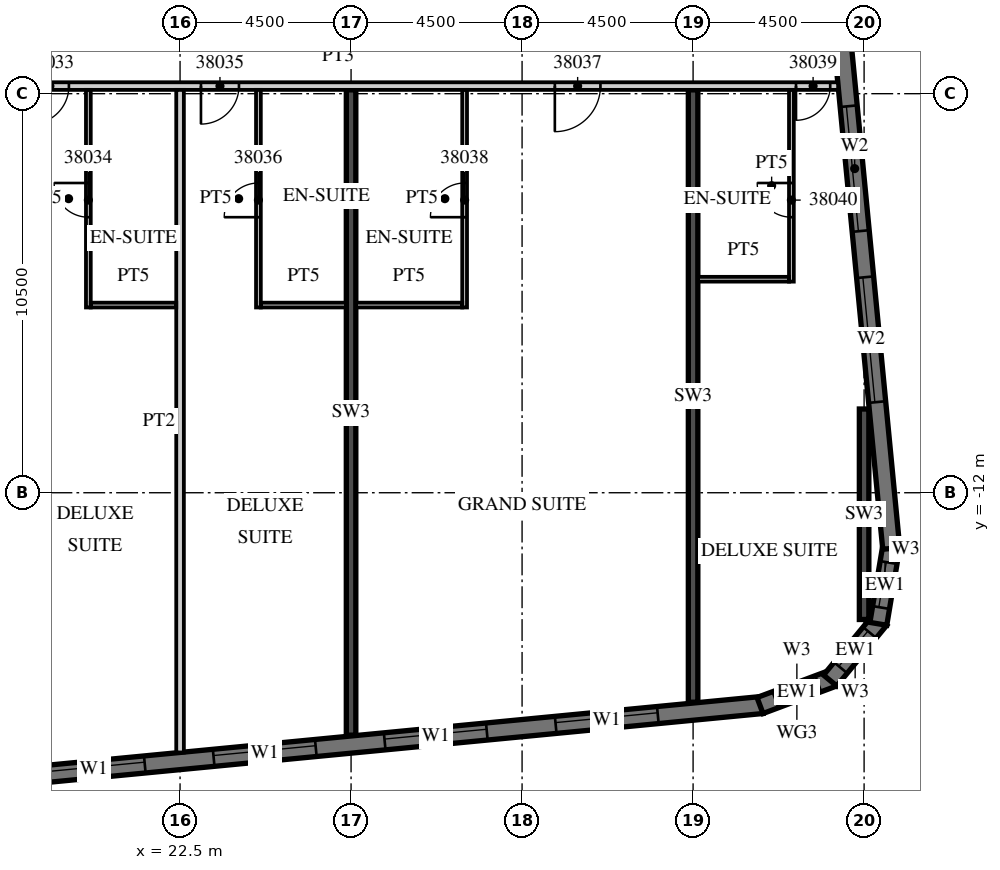
"""IFC4 building model, lengths in metres.
Left out: names, types, materials, properties, quantities, classifications, styles, units other than length and angle.
Written with IfcOpenShell. Run it as: python <this file> out.ifc"""

import sys

from ifc_helpers import new_model, si_unit, direction, frame, frame_2d, origin, place, context, subcontext, project, spatial, polyline, rectangle, outline, extrude, element, fill, save


model = new_model("IFC4")
c1 = context("Model", 3, precision=1e-05, world=origin(), true_north=direction((0.0, 1.0)))
c2 = subcontext(c1, "Body", "Model", "MODEL_VIEW")
j1 = project(units=[si_unit("LENGTHUNIT", "METRE"), si_unit("PLANEANGLEUNIT", "RADIAN")], contexts=[c1])
p1 = place(None, origin())
s1 = spatial("IfcSite", under=j1, at=p1, CompositionType="ELEMENT")
p2 = place(p1, origin())
s2 = spatial("IfcBuilding", under=s1, at=p2, CompositionType="ELEMENT")
p3 = place(p2, frame((0.0, 0.0, 166.9)))
s3 = spatial("IfcBuildingStorey", under=s2, at=p3, CompositionType="ELEMENT", Elevation=166.9)
p4 = place(p3, frame((27.0, -18.379, 0.0), z_axis=(0.0, 0.0, 1.0), x_axis=(0.0, 1.0, 0.0)))
e1 = element("IfcWall", 1, at=p4, inside=s3, PredefinedType="SHEAR", context=c2, shape_type="SweptSolid", body=[
    extrude(rectangle(XDim=16.979, YDim=0.25, at=frame_2d((8.489, 0.0))), origin(), (0.0, 0.0, 1.0), 3.3),
])
p5 = place(p3, frame((36.0, -17.512, 0.0), z_axis=(0.0, 0.0, 1.0), x_axis=(0.0, 1.0, 0.0)))
e2 = element("IfcWall", 2, at=p5, inside=s3, PredefinedType="SHEAR", context=c2, shape_type="SweptSolid", body=[
    extrude(rectangle(XDim=16.112, YDim=0.25, at=frame_2d((8.056, 0.0))), origin(), (0.0, 0.0, 1.0), 3.3),
])
p6 = place(p3, frame((40.5, -15.335, 0.0), z_axis=(0.0, 0.0, 1.0), x_axis=(0.0, 1.0, 0.0)))
e3 = element("IfcWall", 3, at=p6, inside=s3, PredefinedType="SHEAR", context=c2, shape_type="SweptSolid", body=[
    extrude(rectangle(XDim=5.538, YDim=0.25, at=frame_2d((2.769, 0.0))), origin(), (0.0, 0.0, 1.0), 3.3),
])
p7 = place(p3, frame((-13.521, -22.529, 0.0), z_axis=(0.0, 0.0, 1.0), x_axis=(0.995396436651, 0.095843277819, 0.0)))
e4 = element("IfcWall", 4, at=p7, inside=s3, PredefinedType="SOLIDWALL", context=c2, shape_type="SweptSolid", body=[
    extrude(rectangle(XDim=51.578, YDim=0.45, at=frame_2d((25.789, 0.0))), origin(), (0.0, 0.0, 1.0), 3.02),
])
p8 = place(p7, frame((0.91, 0.0, 0.45)))
e5 = element("IfcOpeningElement", 5, at=p8, cuts=e4, PredefinedType="OPENING", context=c2, shape_type="SweptSolid", body=[
    extrude(rectangle(XDim=2.7, YDim=2.25, at=frame_2d((1.35, 1.125))), frame((0.0, 0.235, 0.0), z_axis=(0.0, -1.0, 0.0), x_axis=(1.0, 0.0, 0.0)), (0.0, 0.0, 1.0), 0.47),
])
p9 = place(p7, frame((5.431, 0.0, 0.45)))
e6 = element("IfcOpeningElement", 6, at=p9, cuts=e4, PredefinedType="OPENING", context=c2, shape_type="SweptSolid", body=[
    extrude(rectangle(XDim=2.7, YDim=2.25, at=frame_2d((1.35, 1.125))), frame((0.0, 0.235, 0.0), z_axis=(0.0, -1.0, 0.0), x_axis=(1.0, 0.0, 0.0)), (0.0, 0.0, 1.0), 0.47),
])
p10 = place(p7, frame((9.952, 0.0, 0.45)))
e7 = element("IfcOpeningElement", 7, at=p10, cuts=e4, PredefinedType="OPENING", context=c2, shape_type="SweptSolid", body=[
    extrude(rectangle(XDim=2.7, YDim=2.25, at=frame_2d((1.35, 1.125))), frame((0.0, 0.235, 0.0), z_axis=(0.0, -1.0, 0.0), x_axis=(1.0, 0.0, 0.0)), (0.0, 0.0, 1.0), 0.47),
])
p11 = place(p7, frame((14.473, 0.0, 0.45)))
e8 = element("IfcOpeningElement", 8, at=p11, cuts=e4, PredefinedType="OPENING", context=c2, shape_type="SweptSolid", body=[
    extrude(rectangle(XDim=2.7, YDim=2.25, at=frame_2d((1.35, 1.125))), frame((0.0, 0.235, 0.0), z_axis=(0.0, -1.0, 0.0), x_axis=(1.0, 0.0, 0.0)), (0.0, 0.0, 1.0), 0.47),
])
p12 = place(p7, frame((18.994, 0.0, 0.45)))
e9 = element("IfcOpeningElement", 9, at=p12, cuts=e4, PredefinedType="OPENING", context=c2, shape_type="SweptSolid", body=[
    extrude(rectangle(XDim=2.7, YDim=2.25, at=frame_2d((1.35, 1.125))), frame((0.0, 0.235, 0.0), z_axis=(0.0, -1.0, 0.0), x_axis=(1.0, 0.0, 0.0)), (0.0, 0.0, 1.0), 0.47),
])
p13 = place(p7, frame((23.514, 0.0, 0.45)))
e10 = element("IfcOpeningElement", 10, at=p13, cuts=e4, PredefinedType="OPENING", context=c2, shape_type="SweptSolid", body=[
    extrude(rectangle(XDim=2.7, YDim=2.25, at=frame_2d((1.35, 1.125))), frame((0.0, 0.235, 0.0), z_axis=(0.0, -1.0, 0.0), x_axis=(1.0, 0.0, 0.0)), (0.0, 0.0, 1.0), 0.47),
])
p14 = place(p7, frame((28.035, 0.0, 0.45)))
e11 = element("IfcOpeningElement", 11, at=p14, cuts=e4, PredefinedType="OPENING", context=c2, shape_type="SweptSolid", body=[
    extrude(rectangle(XDim=2.7, YDim=2.25, at=frame_2d((1.35, 1.125))), frame((0.0, 0.235, 0.0), z_axis=(0.0, -1.0, 0.0), x_axis=(1.0, 0.0, 0.0)), (0.0, 0.0, 1.0), 0.47),
])
p15 = place(p7, frame((32.556, 0.0, 0.45)))
e12 = element("IfcOpeningElement", 12, at=p15, cuts=e4, PredefinedType="OPENING", context=c2, shape_type="SweptSolid", body=[
    extrude(rectangle(XDim=2.7, YDim=2.25, at=frame_2d((1.35, 1.125))), frame((0.0, 0.235, 0.0), z_axis=(0.0, -1.0, 0.0), x_axis=(1.0, 0.0, 0.0)), (0.0, 0.0, 1.0), 0.47),
])
p16 = place(p7, frame((37.077, 0.0, 0.45)))
e13 = element("IfcOpeningElement", 13, at=p16, cuts=e4, PredefinedType="OPENING", context=c2, shape_type="SweptSolid", body=[
    extrude(rectangle(XDim=2.7, YDim=2.25, at=frame_2d((1.35, 1.125))), frame((0.0, 0.235, 0.0), z_axis=(0.0, -1.0, 0.0), x_axis=(1.0, 0.0, 0.0)), (0.0, 0.0, 1.0), 0.47),
])
p17 = place(p7, frame((41.598, 0.0, 0.45)))
e14 = element("IfcOpeningElement", 14, at=p17, cuts=e4, PredefinedType="OPENING", context=c2, shape_type="SweptSolid", body=[
    extrude(rectangle(XDim=2.7, YDim=2.25, at=frame_2d((1.35, 1.125))), frame((0.0, 0.235, 0.0), z_axis=(0.0, -1.0, 0.0), x_axis=(1.0, 0.0, 0.0)), (0.0, 0.0, 1.0), 0.47),
])
p18 = place(p7, frame((46.119, 0.0, 0.45)))
e15 = element("IfcOpeningElement", 15, at=p18, cuts=e4, PredefinedType="OPENING", context=c2, shape_type="SweptSolid", body=[
    extrude(rectangle(XDim=2.7, YDim=2.25, at=frame_2d((1.35, 1.125))), frame((0.0, 0.235, 0.0), z_axis=(0.0, -1.0, 0.0), x_axis=(1.0, 0.0, 0.0)), (0.0, 0.0, 1.0), 0.47),
])
p19 = place(p3, frame((37.761, -17.598, 0.0), z_axis=(0.0, 0.0, 1.0), x_axis=(0.936677599948, 0.350192909346, 0.0)))
e16 = element("IfcWall", 16, at=p19, inside=s3, PredefinedType="SOLIDWALL", context=c2, shape_type="SweptSolid", body=[
    extrude(outline(polyline([(0.0, -0.225), (2.071, -0.225), (1.95, 0.225), (0.121, 0.225), (0.0, -0.225)])), origin(), (0.0, 0.0, 1.0), 3.02),
])
p20 = place(p19, frame((0.435, 0.0, 0.45)))
e17 = element("IfcOpeningElement", 17, at=p20, cuts=e16, PredefinedType="OPENING", context=c2, shape_type="SweptSolid", body=[
    extrude(rectangle(XDim=1.2, YDim=2.25, at=frame_2d((0.6, 1.125))), frame((0.0, 0.235, 0.0), z_axis=(0.0, -1.0, 0.0), x_axis=(1.0, 0.0, 0.0)), (0.0, 0.0, 1.0), 0.47),
])
p21 = place(p3, frame((39.606, -16.941, 0.0), z_axis=(0.0, 0.0, 1.0), x_axis=(0.636116318187, 0.771593176315, 0.0)))
e18 = element("IfcWall", 18, at=p21, inside=s3, PredefinedType="SOLIDWALL", context=c2, shape_type="SweptSolid", body=[
    extrude(outline(polyline([(0.0, -0.225), (2.071, -0.225), (1.95, 0.225), (0.121, 0.225), (0.0, -0.225)])), origin(), (0.0, 0.0, 1.0), 3.02),
])
p22 = place(p21, frame((0.435, 0.0, 0.45)))
e19 = element("IfcOpeningElement", 19, at=p22, cuts=e18, PredefinedType="OPENING", context=c2, shape_type="SweptSolid", body=[
    extrude(rectangle(XDim=1.2, YDim=2.25, at=frame_2d((0.6, 1.125))), frame((0.0, 0.235, 0.0), z_axis=(0.0, -1.0, 0.0), x_axis=(1.0, 0.0, 0.0)), (0.0, 0.0, 1.0), 0.47),
])
p23 = place(p3, frame((40.875, -15.449, 0.0), z_axis=(0.0, 0.0, 1.0), x_axis=(0.164953448126, 0.986301353518, 0.0)))
e20 = element("IfcWall", 20, at=p23, inside=s3, PredefinedType="SOLIDWALL", context=c2, shape_type="SweptSolid", body=[
    extrude(outline(polyline([(0.0, -0.225), (2.071, -0.225), (1.95, 0.225), (0.121, 0.225), (0.0, -0.225)])), origin(), (0.0, 0.0, 1.0), 3.02),
])
p24 = place(p23, frame((0.435, 0.0, 0.45)))
e21 = element("IfcOpeningElement", 21, at=p24, cuts=e20, PredefinedType="OPENING", context=c2, shape_type="SweptSolid", body=[
    extrude(rectangle(XDim=1.2, YDim=2.25, at=frame_2d((0.6, 1.125))), frame((0.0, 0.235, 0.0), z_axis=(0.0, -1.0, 0.0), x_axis=(1.0, 0.0, 0.0)), (0.0, 0.0, 1.0), 0.47),
])
p25 = place(p3, frame((41.214, -13.466, 0.0), z_axis=(0.0, 0.0, 1.0), x_axis=(-0.095847314626, 0.995396047952, 0.0)))
e22 = element("IfcWall", 22, at=p25, inside=s3, PredefinedType="SOLIDWALL", context=c2, shape_type="SweptSolid", body=[
    extrude(rectangle(XDim=34.0, YDim=0.45, at=frame_2d((17.0, 0.0))), origin(), (0.0, 0.0, 1.0), 3.02),
])
p26 = place(p25, frame((3.869, 0.0, 0.45)))
e23 = element("IfcOpeningElement", 23, at=p26, cuts=e22, PredefinedType="OPENING", context=c2, shape_type="SweptSolid", body=[
    extrude(rectangle(XDim=3.3, YDim=2.25, at=frame_2d((1.65, 1.125))), frame((0.0, 0.235, 0.0), z_axis=(0.0, -1.0, 0.0), x_axis=(1.0, 0.0, 0.0)), (0.0, 0.0, 1.0), 0.47),
])
p27 = place(p25, frame((8.39, 0.0, 0.45)))
e24 = element("IfcOpeningElement", 24, at=p27, cuts=e22, PredefinedType="OPENING", context=c2, shape_type="SweptSolid", body=[
    extrude(rectangle(XDim=3.3, YDim=2.25, at=frame_2d((1.65, 1.125))), frame((0.0, 0.235, 0.0), z_axis=(0.0, -1.0, 0.0), x_axis=(1.0, 0.0, 0.0)), (0.0, 0.0, 1.0), 0.47),
])
p28 = place(p3, frame((13.5, -1.3, 0.0), z_axis=(0.0, 0.0, 1.0), x_axis=(1.0, 0.0, 0.0)))
e25 = element("IfcWall", 25, at=p28, inside=s3, PredefinedType="PARTITIONING", context=c2, shape_type="SweptSolid", body=[
    extrude(rectangle(XDim=26.317, YDim=0.2, at=frame_2d((13.158, 0.0))), origin(), (0.0, 0.0, 1.0), 3.02),
])
p29 = place(p28, frame((2.925, 0.0, 0.0)))
e26 = element("IfcOpeningElement", 26, at=p29, cuts=e25, PredefinedType="OPENING", context=c2, shape_type="SweptSolid", body=[
    extrude(rectangle(XDim=1.0, YDim=2.1, at=frame_2d((0.5, 1.05))), frame((0.0, 0.11, 0.0), z_axis=(0.0, -1.0, 0.0), x_axis=(1.0, 0.0, 0.0)), (0.0, 0.0, 1.0), 0.22),
])
p30 = place(p28, frame((5.075, 0.0, 0.0)))
e27 = element("IfcOpeningElement", 27, at=p30, cuts=e25, PredefinedType="OPENING", context=c2, shape_type="SweptSolid", body=[
    extrude(rectangle(XDim=1.0, YDim=2.1, at=frame_2d((0.5, 1.05))), frame((0.0, 0.11, 0.0), z_axis=(0.0, -1.0, 0.0), x_axis=(1.0, 0.0, 0.0)), (0.0, 0.0, 1.0), 0.22),
])
p31 = place(p28, frame((9.55, 0.0, 0.0)))
e28 = element("IfcOpeningElement", 28, at=p31, cuts=e25, PredefinedType="OPENING", context=c2, shape_type="SweptSolid", body=[
    extrude(rectangle(XDim=1.0, YDim=2.1, at=frame_2d((0.5, 1.05))), frame((0.0, 0.11, 0.0), z_axis=(0.0, -1.0, 0.0), x_axis=(1.0, 0.0, 0.0)), (0.0, 0.0, 1.0), 0.22),
])
p32 = place(p28, frame((18.862, 0.0, 0.0)))
e29 = element("IfcOpeningElement", 29, at=p32, cuts=e25, PredefinedType="OPENING", context=c2, shape_type="SweptSolid", body=[
    extrude(rectangle(XDim=1.2, YDim=2.1, at=frame_2d((0.6, 1.05))), frame((0.0, 0.11, 0.0), z_axis=(0.0, -1.0, 0.0), x_axis=(1.0, 0.0, 0.0)), (0.0, 0.0, 1.0), 0.22),
])
p33 = place(p28, frame((25.208, 0.0, 0.0)))
e30 = element("IfcOpeningElement", 30, at=p33, cuts=e25, PredefinedType="OPENING", context=c2, shape_type="SweptSolid", body=[
    extrude(rectangle(XDim=0.9, YDim=2.1, at=frame_2d((0.45, 1.05))), frame((0.0, 0.11, 0.0), z_axis=(0.0, -1.0, 0.0), x_axis=(1.0, 0.0, 0.0)), (0.0, 0.0, 1.0), 0.22),
])
p34 = place(p3, frame((22.5, -18.834, 0.0), z_axis=(0.0, 0.0, 1.0), x_axis=(0.0, 1.0, 0.0)))
e31 = element("IfcWall", 31, at=p34, inside=s3, PredefinedType="PARTITIONING", context=c2, shape_type="SweptSolid", body=[
    extrude(rectangle(XDim=17.434, YDim=0.2, at=frame_2d((8.717, 0.0))), origin(), (0.0, 0.0, 1.0), 3.02),
])
p35 = place(p3, frame((20.087, -7.125, 0.0), z_axis=(0.0, 0.0, 1.0), x_axis=(0.0, 1.0, 0.0)))
e32 = element("IfcWall", 32, at=p35, inside=s3, PredefinedType="PARTITIONING", context=c2, shape_type="SweptSolid", body=[
    extrude(rectangle(XDim=5.725, YDim=0.125, at=frame_2d((2.863, 0.0))), origin(), (0.0, 0.0, 1.0), 3.02),
])
p36 = place(p35, frame((2.375, 0.0, 0.0)))
e33 = element("IfcOpeningElement", 33, at=p36, cuts=e32, PredefinedType="OPENING", context=c2, shape_type="SweptSolid", body=[
    extrude(rectangle(XDim=0.9, YDim=2.1, at=frame_2d((0.45, 1.05))), frame((0.0, 0.073, 0.0), z_axis=(0.0, -1.0, 0.0), x_axis=(1.0, 0.0, 0.0)), (0.0, 0.0, 1.0), 0.145),
])
p37 = place(p3, frame((20.15, -7.062, 0.0), z_axis=(0.0, 0.0, 1.0), x_axis=(1.0, 0.0, 0.0)))
e34 = element("IfcWall", 34, at=p37, inside=s3, PredefinedType="PARTITIONING", context=c2, shape_type="SweptSolid", body=[
    extrude(rectangle(XDim=2.25, YDim=0.125, at=frame_2d((1.125, 0.0))), origin(), (0.0, 0.0, 1.0), 3.02),
])
p38 = place(p3, frame((24.562, -7.125, 0.0), z_axis=(0.0, 0.0, 1.0), x_axis=(0.0, 1.0, 0.0)))
e35 = element("IfcWall", 35, at=p38, inside=s3, PredefinedType="PARTITIONING", context=c2, shape_type="SweptSolid", body=[
    extrude(rectangle(XDim=5.725, YDim=0.125, at=frame_2d((2.863, 0.0))), origin(), (0.0, 0.0, 1.0), 3.02),
])
p39 = place(p38, frame((2.375, 0.0, 0.0)))
e36 = element("IfcOpeningElement", 36, at=p39, cuts=e35, PredefinedType="OPENING", context=c2, shape_type="SweptSolid", body=[
    extrude(rectangle(XDim=0.9, YDim=2.1, at=frame_2d((0.45, 1.05))), frame((0.0, 0.073, 0.0), z_axis=(0.0, -1.0, 0.0), x_axis=(1.0, 0.0, 0.0)), (0.0, 0.0, 1.0), 0.145),
])
p40 = place(p3, frame((24.625, -7.062, 0.0), z_axis=(0.0, 0.0, 1.0), x_axis=(1.0, 0.0, 0.0)))
e37 = element("IfcWall", 37, at=p40, inside=s3, PredefinedType="PARTITIONING", context=c2, shape_type="SweptSolid", body=[
    extrude(rectangle(XDim=2.25, YDim=0.125, at=frame_2d((1.125, 0.0))), origin(), (0.0, 0.0, 1.0), 3.02),
])
p41 = place(p3, frame((29.988, -7.125, 0.0), z_axis=(0.0, 0.0, 1.0), x_axis=(0.0, 1.0, 0.0)))
e38 = element("IfcWall", 38, at=p41, inside=s3, PredefinedType="PARTITIONING", context=c2, shape_type="SweptSolid", body=[
    extrude(rectangle(XDim=5.725, YDim=0.125, at=frame_2d((2.863, 0.0))), origin(), (0.0, 0.0, 1.0), 3.02),
])
p42 = place(p41, frame((2.375, 0.0, 0.0)))
e39 = element("IfcOpeningElement", 39, at=p42, cuts=e38, PredefinedType="OPENING", context=c2, shape_type="SweptSolid", body=[
    extrude(rectangle(XDim=0.9, YDim=2.1, at=frame_2d((0.45, 1.05))), frame((0.0, 0.073, 0.0), z_axis=(0.0, -1.0, 0.0), x_axis=(1.0, 0.0, 0.0)), (0.0, 0.0, 1.0), 0.145),
])
p43 = place(p3, frame((27.125, -7.062, 0.0), z_axis=(0.0, 0.0, 1.0), x_axis=(1.0, 0.0, 0.0)))
e40 = element("IfcWall", 40, at=p43, inside=s3, PredefinedType="PARTITIONING", context=c2, shape_type="SweptSolid", body=[
    extrude(rectangle(XDim=2.8, YDim=0.125, at=frame_2d((1.4, 0.0))), origin(), (0.0, 0.0, 1.0), 3.02),
])
p44 = place(p3, frame((38.587, -6.445, 0.0), z_axis=(0.0, 0.0, 1.0), x_axis=(0.0, 1.0, 0.0)))
e41 = element("IfcWall", 41, at=p44, inside=s3, PredefinedType="PARTITIONING", context=c2, shape_type="SweptSolid", body=[
    extrude(rectangle(XDim=5.045, YDim=0.125, at=frame_2d((2.522, 0.0))), origin(), (0.0, 0.0, 1.0), 3.02),
])
p45 = place(p44, frame((1.695, 0.0, 0.0)))
e42 = element("IfcOpeningElement", 42, at=p45, cuts=e41, PredefinedType="OPENING", context=c2, shape_type="SweptSolid", body=[
    extrude(rectangle(XDim=0.9, YDim=2.1, at=frame_2d((0.45, 1.05))), frame((0.0, 0.073, 0.0), z_axis=(0.0, -1.0, 0.0), x_axis=(1.0, 0.0, 0.0)), (0.0, 0.0, 1.0), 0.145),
])
p46 = place(p3, frame((36.125, -6.382, 0.0), z_axis=(0.0, 0.0, 1.0), x_axis=(1.0, 0.0, 0.0)))
e43 = element("IfcWall", 43, at=p46, inside=s3, PredefinedType="PARTITIONING", context=c2, shape_type="SweptSolid", body=[
    extrude(rectangle(XDim=2.4, YDim=0.125, at=frame_2d((1.2, 0.0))), origin(), (0.0, 0.0, 1.0), 3.02),
])
p47 = place(p15, origin())
e44 = element("IfcWindow", 44, at=p47, inside=s3, PartitioningType="SINGLE_PANEL", PredefinedType="WINDOW", context=c2, shape_type="SweptSolid", body=[
    extrude(rectangle(XDim=2.7, YDim=2.25, at=frame_2d((1.35, 1.125))), frame((0.0, 0.09, 0.0), z_axis=(0.0, -1.0, 0.0), x_axis=(1.0, 0.0, 0.0)), (0.0, 0.0, 1.0), 0.06),
])
fill(e12, e44)
p48 = place(p16, origin())
e45 = element("IfcWindow", 45, at=p48, inside=s3, PartitioningType="SINGLE_PANEL", PredefinedType="WINDOW", context=c2, shape_type="SweptSolid", body=[
    extrude(rectangle(XDim=2.7, YDim=2.25, at=frame_2d((1.35, 1.125))), frame((0.0, 0.09, 0.0), z_axis=(0.0, -1.0, 0.0), x_axis=(1.0, 0.0, 0.0)), (0.0, 0.0, 1.0), 0.06),
])
fill(e13, e45)
p49 = place(p17, origin())
e46 = element("IfcWindow", 46, at=p49, inside=s3, PartitioningType="SINGLE_PANEL", PredefinedType="WINDOW", context=c2, shape_type="SweptSolid", body=[
    extrude(rectangle(XDim=2.7, YDim=2.25, at=frame_2d((1.35, 1.125))), frame((0.0, 0.09, 0.0), z_axis=(0.0, -1.0, 0.0), x_axis=(1.0, 0.0, 0.0)), (0.0, 0.0, 1.0), 0.06),
])
fill(e14, e46)
p50 = place(p18, origin())
e47 = element("IfcWindow", 47, at=p50, inside=s3, PartitioningType="SINGLE_PANEL", PredefinedType="WINDOW", context=c2, shape_type="SweptSolid", body=[
    extrude(rectangle(XDim=2.7, YDim=2.25, at=frame_2d((1.35, 1.125))), frame((0.0, 0.09, 0.0), z_axis=(0.0, -1.0, 0.0), x_axis=(1.0, 0.0, 0.0)), (0.0, 0.0, 1.0), 0.06),
])
fill(e15, e47)
p51 = place(p20, origin())
e48 = element("IfcWindow", 48, at=p51, inside=s3, PartitioningType="SINGLE_PANEL", PredefinedType="WINDOW", context=c2, shape_type="SweptSolid", body=[
    extrude(rectangle(XDim=1.2, YDim=2.25, at=frame_2d((0.6, 1.125))), frame((0.0, 0.09, 0.0), z_axis=(0.0, -1.0, 0.0), x_axis=(1.0, 0.0, 0.0)), (0.0, 0.0, 1.0), 0.06),
])
fill(e17, e48)
p52 = place(p22, origin())
e49 = element("IfcWindow", 49, at=p52, inside=s3, PartitioningType="SINGLE_PANEL", PredefinedType="WINDOW", context=c2, shape_type="SweptSolid", body=[
    extrude(rectangle(XDim=1.2, YDim=2.25, at=frame_2d((0.6, 1.125))), frame((0.0, 0.09, 0.0), z_axis=(0.0, -1.0, 0.0), x_axis=(1.0, 0.0, 0.0)), (0.0, 0.0, 1.0), 0.06),
])
fill(e19, e49)
p53 = place(p24, origin())
e50 = element("IfcWindow", 50, at=p53, inside=s3, PartitioningType="SINGLE_PANEL", PredefinedType="WINDOW", context=c2, shape_type="SweptSolid", body=[
    extrude(rectangle(XDim=1.2, YDim=2.25, at=frame_2d((0.6, 1.125))), frame((0.0, 0.09, 0.0), z_axis=(0.0, -1.0, 0.0), x_axis=(1.0, 0.0, 0.0)), (0.0, 0.0, 1.0), 0.06),
])
fill(e21, e50)
p54 = place(p26, origin())
e51 = element("IfcWindow", 51, at=p54, inside=s3, PartitioningType="SINGLE_PANEL", PredefinedType="WINDOW", context=c2, shape_type="SweptSolid", body=[
    extrude(rectangle(XDim=3.3, YDim=2.25, at=frame_2d((1.65, 1.125))), frame((0.0, 0.09, 0.0), z_axis=(0.0, -1.0, 0.0), x_axis=(1.0, 0.0, 0.0)), (0.0, 0.0, 1.0), 0.06),
])
fill(e23, e51)
p55 = place(p27, origin())
e52 = element("IfcWindow", 52, at=p55, inside=s3, PartitioningType="SINGLE_PANEL", PredefinedType="WINDOW", context=c2, shape_type="SweptSolid", body=[
    extrude(rectangle(XDim=3.3, YDim=2.25, at=frame_2d((1.65, 1.125))), frame((0.0, 0.09, 0.0), z_axis=(0.0, -1.0, 0.0), x_axis=(1.0, 0.0, 0.0)), (0.0, 0.0, 1.0), 0.06),
])
fill(e24, e52)
p56 = place(p30, origin())
e53 = element("IfcDoor", 53, at=p56, inside=s3, OperationType="SINGLE_SWING_LEFT", PredefinedType="DOOR", context=c2, shape_type="SweptSolid", body=[
    extrude(rectangle(XDim=1.0, YDim=2.1, at=frame_2d((0.5, 1.05))), frame((0.0, 0.025, 0.0), z_axis=(0.0, -1.0, 0.0), x_axis=(1.0, 0.0, 0.0)), (0.0, 0.0, 1.0), 0.05),
])
fill(e27, e53)
p57 = place(p36, origin())
e54 = element("IfcDoor", 54, at=p57, inside=s3, OperationType="SINGLE_SWING_RIGHT", PredefinedType="DOOR", context=c2, shape_type="SweptSolid", body=[
    extrude(rectangle(XDim=0.9, YDim=2.1, at=frame_2d((0.45, 1.05))), frame((0.0, 0.025, 0.0), z_axis=(0.0, -1.0, 0.0), x_axis=(1.0, 0.0, 0.0)), (0.0, 0.0, 1.0), 0.05),
])
fill(e33, e54)
p58 = place(p31, origin())
e55 = element("IfcDoor", 55, at=p58, inside=s3, OperationType="SINGLE_SWING_LEFT", PredefinedType="DOOR", context=c2, shape_type="SweptSolid", body=[
    extrude(rectangle(XDim=1.0, YDim=2.1, at=frame_2d((0.5, 1.05))), frame((0.0, 0.025, 0.0), z_axis=(0.0, -1.0, 0.0), x_axis=(1.0, 0.0, 0.0)), (0.0, 0.0, 1.0), 0.05),
])
fill(e28, e55)
p59 = place(p39, origin())
e56 = element("IfcDoor", 56, at=p59, inside=s3, OperationType="SINGLE_SWING_LEFT", PredefinedType="DOOR", context=c2, shape_type="SweptSolid", body=[
    extrude(rectangle(XDim=0.9, YDim=2.1, at=frame_2d((0.45, 1.05))), frame((0.0, 0.025, 0.0), z_axis=(0.0, -1.0, 0.0), x_axis=(1.0, 0.0, 0.0)), (0.0, 0.0, 1.0), 0.05),
])
fill(e36, e56)
p60 = place(p32, origin())
e57 = element("IfcDoor", 57, at=p60, inside=s3, OperationType="SINGLE_SWING_LEFT", PredefinedType="DOOR", context=c2, shape_type="SweptSolid", body=[
    extrude(rectangle(XDim=1.2, YDim=2.1, at=frame_2d((0.6, 1.05))), frame((0.0, 0.025, 0.0), z_axis=(0.0, -1.0, 0.0), x_axis=(1.0, 0.0, 0.0)), (0.0, 0.0, 1.0), 0.05),
])
fill(e29, e57)
p61 = place(p42, origin())
e58 = element("IfcDoor", 58, at=p61, inside=s3, OperationType="SINGLE_SWING_LEFT", PredefinedType="DOOR", context=c2, shape_type="SweptSolid", body=[
    extrude(rectangle(XDim=0.9, YDim=2.1, at=frame_2d((0.45, 1.05))), frame((0.0, 0.025, 0.0), z_axis=(0.0, -1.0, 0.0), x_axis=(1.0, 0.0, 0.0)), (0.0, 0.0, 1.0), 0.05),
])
fill(e39, e58)
p62 = place(p33, origin())
e59 = element("IfcDoor", 59, at=p62, inside=s3, OperationType="SINGLE_SWING_LEFT", PredefinedType="DOOR", context=c2, shape_type="SweptSolid", body=[
    extrude(rectangle(XDim=0.9, YDim=2.1, at=frame_2d((0.45, 1.05))), frame((0.0, 0.025, 0.0), z_axis=(0.0, -1.0, 0.0), x_axis=(1.0, 0.0, 0.0)), (0.0, 0.0, 1.0), 0.05),
])
fill(e30, e59)
p63 = place(p45, origin())
e60 = element("IfcDoor", 60, at=p63, inside=s3, OperationType="SINGLE_SWING_RIGHT", PredefinedType="DOOR", context=c2, shape_type="SweptSolid", body=[
    extrude(rectangle(XDim=0.9, YDim=2.1, at=frame_2d((0.45, 1.05))), frame((0.0, 0.025, 0.0), z_axis=(0.0, -1.0, 0.0), x_axis=(1.0, 0.0, 0.0)), (0.0, 0.0, 1.0), 0.05),
])
fill(e42, e60)
save(model, sys.argv[1])
